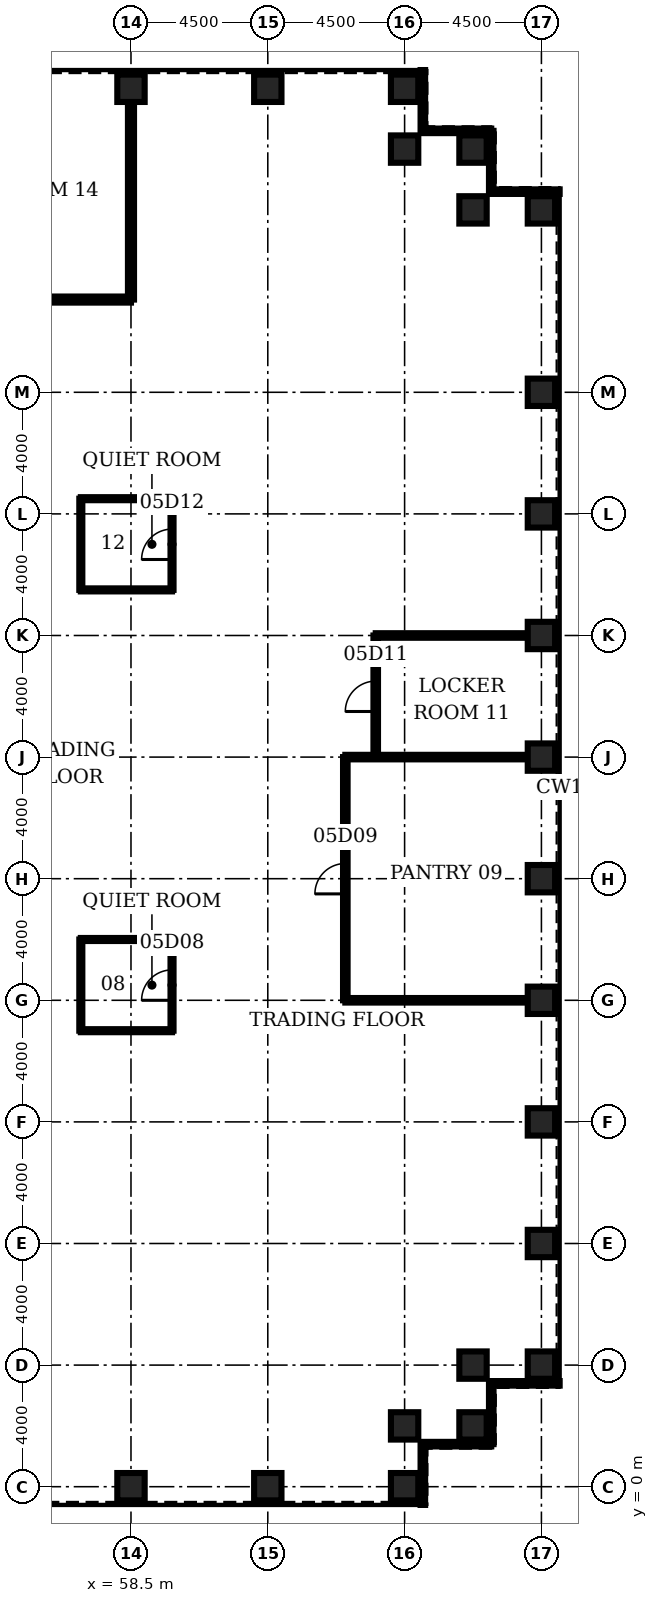
"""IFC4 building model, lengths in metres.
Left out: names, types, materials, properties, quantities, classifications, styles, units other than length and angle.
Written with IfcOpenShell. Run it as: python <this file> out.ifc"""

import sys

from ifc_helpers import new_model, si_unit, direction, frame, frame_2d, origin, origin_2d, place, context, subcontext, project, spatial, rectangle, hollow_rectangle, extrude, element, fill, save


model = new_model("IFC4")
c1 = context("Model", 3, precision=1e-05, world=origin(), true_north=direction((0.0, 1.0)))
c2 = subcontext(c1, "Body", "Model", "MODEL_VIEW")
j1 = project(units=[si_unit("LENGTHUNIT", "METRE"), si_unit("PLANEANGLEUNIT", "RADIAN")], contexts=[c1])
p1 = place(None, origin())
s1 = spatial("IfcSite", under=j1, at=p1, CompositionType="ELEMENT")
p2 = place(p1, origin())
s2 = spatial("IfcBuilding", under=s1, at=p2, CompositionType="ELEMENT")
p3 = place(p2, frame((0.0, 0.0, 27.5)))
s3 = spatial("IfcBuildingStorey", under=s2, at=p3, CompositionType="ELEMENT", Elevation=27.5)
for number, where, z_axis, x_axis in (
    (1, (58.5, 0.0, 0.0), (0.0, 0.0, 1.0), (0.0, 1.0, 0.0)),
    (2, (63.0, 0.0, 0.0), (0.0, 0.0, 1.0), (0.0, 1.0, 0.0)),
    (3, (67.5, 0.0, 0.0), (0.0, 0.0, 1.0), (0.0, 1.0, 0.0)),
    (4, (67.5, 2.0, 0.0), (0.0, 0.0, 1.0), (0.0, 1.0, 0.0)),
    (5, (69.75, 2.0, 0.0), (0.0, 0.0, 1.0), (1.0, 0.0, 0.0)),
    (6, (69.75, 4.0, 0.0), (0.0, 0.0, 1.0), (1.0, 0.0, 0.0)),
    (7, (72.0, 4.0, 0.0), (0.0, 0.0, 1.0), (1.0, 0.0, 0.0)),
    (8, (72.0, 8.0, 0.0), (0.0, 0.0, 1.0), (1.0, 0.0, 0.0)),
    (9, (72.0, 12.0, 0.0), (0.0, 0.0, 1.0), (1.0, 0.0, 0.0)),
    (10, (72.0, 16.0, 0.0), (0.0, 0.0, 1.0), (1.0, 0.0, 0.0)),
    (11, (72.0, 20.0, 0.0), (0.0, 0.0, 1.0), (1.0, 0.0, 0.0)),
    (12, (72.0, 24.0, 0.0), (0.0, 0.0, 1.0), (1.0, 0.0, 0.0)),
    (13, (72.0, 28.0, 0.0), (0.0, 0.0, 1.0), (1.0, 0.0, 0.0)),
    (14, (72.0, 32.0, 0.0), (0.0, 0.0, 1.0), (1.0, 0.0, 0.0)),
    (15, (72.0, 36.0, 0.0), (0.0, 0.0, 1.0), (1.0, 0.0, 0.0)),
    (16, (72.0, 42.0, 0.0), (0.0, 0.0, 1.0), (1.0, 0.0, 0.0)),
    (17, (69.75, 42.0, 0.0), (0.0, 0.0, 1.0), (1.0, 0.0, 0.0)),
    (18, (69.75, 44.0, 0.0), (0.0, 0.0, 1.0), (1.0, 0.0, 0.0)),
    (19, (67.5, 44.0, 0.0), (0.0, 0.0, 1.0), (0.0, 1.0, 0.0)),
    (20, (67.5, 46.0, 0.0), (0.0, 0.0, 1.0), (0.0, 1.0, 0.0)),
    (21, (63.0, 46.0, 0.0), (0.0, 0.0, 1.0), (0.0, 1.0, 0.0)),
    (22, (58.5, 46.0, 0.0), (0.0, 0.0, 1.0), (0.0, 1.0, 0.0)),
):
    element("IfcColumn", number, at=place(p3, frame(where, z_axis=z_axis, x_axis=x_axis)), inside=s3, PredefinedType="COLUMN", context=c2, shape_type="SweptSolid", body=[
        extrude(hollow_rectangle(XDim=0.9, YDim=0.9, WallThickness=0.12, at=origin_2d()), origin(), (0.0, 0.0, 1.0), 4.5),
    ])
p4 = place(p3, frame((56.85, 15.0, 0.0), z_axis=(0.0, 0.0, 1.0), x_axis=(1.0, 0.0, 0.0)))
e23 = element("IfcWall", 23, at=p4, inside=s3, PredefinedType="PARTITIONING", context=c2, shape_type="SweptSolid", body=[
    extrude(rectangle(XDim=3.0, YDim=0.1, at=frame_2d((1.5, 0.0))), origin(), (0.0, 0.0, 1.0), 3.0),
])
p5 = place(p3, frame((65.55, 16.0, 0.0), z_axis=(0.0, 0.0, 1.0), x_axis=(1.0, 0.0, 0.0)))
e24 = element("IfcWall", 24, at=p5, inside=s3, PredefinedType="PARTITIONING", context=c2, shape_type="SweptSolid", body=[
    extrude(rectangle(XDim=6.0, YDim=0.15, at=frame_2d((3.0, 0.0))), origin(), (0.0, 0.0, 1.0), 3.0),
])
p6 = place(p3, frame((56.85, 18.0, 0.0), z_axis=(0.0, 0.0, 1.0), x_axis=(1.0, 0.0, 0.0)))
e25 = element("IfcWall", 25, at=p6, inside=s3, PredefinedType="PARTITIONING", context=c2, shape_type="SweptSolid", body=[
    extrude(rectangle(XDim=3.0, YDim=0.1, at=frame_2d((1.5, 0.0))), origin(), (0.0, 0.0, 1.0), 3.0),
])
p7 = place(p3, frame((65.55, 24.0, 0.0), z_axis=(0.0, 0.0, 1.0), x_axis=(1.0, 0.0, 0.0)))
e26 = element("IfcWall", 26, at=p7, inside=s3, PredefinedType="PARTITIONING", context=c2, shape_type="SweptSolid", body=[
    extrude(rectangle(XDim=6.0, YDim=0.15, at=frame_2d((3.0, 0.0))), origin(), (0.0, 0.0, 1.0), 3.0),
])
p8 = place(p3, frame((66.55, 28.0, 0.0), z_axis=(0.0, 0.0, 1.0), x_axis=(1.0, 0.0, 0.0)))
e27 = element("IfcWall", 27, at=p8, inside=s3, PredefinedType="PARTITIONING", context=c2, shape_type="SweptSolid", body=[
    extrude(rectangle(XDim=5.0, YDim=0.15, at=frame_2d((2.5, 0.0))), origin(), (0.0, 0.0, 1.0), 3.0),
])
for number, where, z_axis, x_axis in (
    (28, (56.85, 29.5, 0.0), (0.0, 0.0, 1.0), (1.0, 0.0, 0.0)),
    (29, (56.85, 32.5, 0.0), (0.0, 0.0, 1.0), (1.0, 0.0, 0.0)),
):
    element("IfcWall", number, at=place(p3, frame(where, z_axis=z_axis, x_axis=x_axis)), inside=s3, PredefinedType="PARTITIONING", context=c2, shape_type="SweptSolid", body=[
        extrude(rectangle(XDim=3.0, YDim=0.1, at=frame_2d((1.5, 0.0))), origin(), (0.0, 0.0, 1.0), 3.0),
    ])
p9 = place(p3, frame((49.5, 39.05, 0.0), z_axis=(0.0, 0.0, 1.0), x_axis=(1.0, 0.0, 0.0)))
e30 = element("IfcWall", 30, at=p9, inside=s3, PredefinedType="PARTITIONING", context=c2, shape_type="SweptSolid", body=[
    extrude(rectangle(XDim=9.0, YDim=0.2, at=frame_2d((4.5, 0.0))), origin(), (0.0, 0.0, 1.0), 3.0),
])
p10 = place(p9, frame((0.45, 0.0, 0.0)))
e31 = element("IfcOpeningElement", 31, at=p10, cuts=e30, PredefinedType="OPENING", context=c2, shape_type="SweptSolid", body=[
    extrude(rectangle(XDim=1.6, YDim=2.1, at=frame_2d((0.8, 1.05))), frame((0.0, 0.11, 0.0), z_axis=(0.0, -1.0, 0.0), x_axis=(1.0, 0.0, 0.0)), (0.0, 0.0, 1.0), 0.22),
])
for number, where, z_axis, x_axis in (
    (32, (56.85, 15.0, 0.0), (0.0, 0.0, 1.0), (0.0, 1.0, 0.0)),
    (33, (56.85, 29.5, 0.0), (0.0, 0.0, 1.0), (0.0, 1.0, 0.0)),
):
    element("IfcWall", number, at=place(p3, frame(where, z_axis=z_axis, x_axis=x_axis)), inside=s3, PredefinedType="PARTITIONING", context=c2, shape_type="SweptSolid", body=[
        extrude(rectangle(XDim=3.0, YDim=0.1, at=frame_2d((1.5, 0.0))), origin(), (0.0, 0.0, 1.0), 3.0),
    ])
p11 = place(p3, frame((58.5, 39.05, 0.0), z_axis=(0.0, 0.0, 1.0), x_axis=(0.0, 1.0, 0.0)))
e34 = element("IfcWall", 34, at=p11, inside=s3, PredefinedType="PARTITIONING", context=c2, shape_type="SweptSolid", body=[
    extrude(rectangle(XDim=6.5, YDim=0.2, at=frame_2d((3.25, 0.0))), origin(), (0.0, 0.0, 1.0), 3.0),
])
p12 = place(p3, frame((59.85, 15.0, 0.0), z_axis=(0.0, 0.0, 1.0), x_axis=(0.0, 1.0, 0.0)))
e35 = element("IfcWall", 35, at=p12, inside=s3, PredefinedType="PARTITIONING", context=c2, shape_type="SweptSolid", body=[
    extrude(rectangle(XDim=3.0, YDim=0.1, at=frame_2d((1.5, 0.0))), origin(), (0.0, 0.0, 1.0), 3.0),
])
p13 = place(p12, frame((1.0, 0.0, 0.0)))
e36 = element("IfcOpeningElement", 36, at=p13, cuts=e35, PredefinedType="OPENING", context=c2, shape_type="SweptSolid", body=[
    extrude(rectangle(XDim=1.0, YDim=2.1, at=frame_2d((0.5, 1.05))), frame((0.0, 0.06, 0.0), z_axis=(0.0, -1.0, 0.0), x_axis=(1.0, 0.0, 0.0)), (0.0, 0.0, 1.0), 0.12),
])
p14 = place(p3, frame((59.85, 29.5, 0.0), z_axis=(0.0, 0.0, 1.0), x_axis=(0.0, 1.0, 0.0)))
e37 = element("IfcWall", 37, at=p14, inside=s3, PredefinedType="PARTITIONING", context=c2, shape_type="SweptSolid", body=[
    extrude(rectangle(XDim=3.0, YDim=0.1, at=frame_2d((1.5, 0.0))), origin(), (0.0, 0.0, 1.0), 3.0),
])
p15 = place(p14, frame((1.0, 0.0, 0.0)))
e38 = element("IfcOpeningElement", 38, at=p15, cuts=e37, PredefinedType="OPENING", context=c2, shape_type="SweptSolid", body=[
    extrude(rectangle(XDim=1.0, YDim=2.1, at=frame_2d((0.5, 1.05))), frame((0.0, 0.06, 0.0), z_axis=(0.0, -1.0, 0.0), x_axis=(1.0, 0.0, 0.0)), (0.0, 0.0, 1.0), 0.12),
])
p16 = place(p3, frame((65.55, 16.0, 0.0), z_axis=(0.0, 0.0, 1.0), x_axis=(0.0, 1.0, 0.0)))
e39 = element("IfcWall", 39, at=p16, inside=s3, PredefinedType="PARTITIONING", context=c2, shape_type="SweptSolid", body=[
    extrude(rectangle(XDim=8.0, YDim=0.15, at=frame_2d((4.0, 0.0))), origin(), (0.0, 0.0, 1.0), 3.0),
])
p17 = place(p16, frame((3.5, 0.0, 0.0)))
e40 = element("IfcOpeningElement", 40, at=p17, cuts=e39, PredefinedType="OPENING", context=c2, shape_type="SweptSolid", body=[
    extrude(rectangle(XDim=1.0, YDim=2.1, at=frame_2d((0.5, 1.05))), frame((0.0, 0.085, 0.0), z_axis=(0.0, -1.0, 0.0), x_axis=(1.0, 0.0, 0.0)), (0.0, 0.0, 1.0), 0.17),
])
p18 = place(p3, frame((66.55, 24.0, 0.0), z_axis=(0.0, 0.0, 1.0), x_axis=(0.0, 1.0, 0.0)))
e41 = element("IfcWall", 41, at=p18, inside=s3, PredefinedType="PARTITIONING", context=c2, shape_type="SweptSolid", body=[
    extrude(rectangle(XDim=4.0, YDim=0.15, at=frame_2d((2.0, 0.0))), origin(), (0.0, 0.0, 1.0), 3.0),
])
p19 = place(p18, frame((1.5, 0.0, 0.0)))
e42 = element("IfcOpeningElement", 42, at=p19, cuts=e41, PredefinedType="OPENING", context=c2, shape_type="SweptSolid", body=[
    extrude(rectangle(XDim=1.0, YDim=2.1, at=frame_2d((0.5, 1.05))), frame((0.0, 0.085, 0.0), z_axis=(0.0, -1.0, 0.0), x_axis=(1.0, 0.0, 0.0)), (0.0, 0.0, 1.0), 0.17),
])
p20 = place(p3, frame((68.1, -0.6, 0.0), z_axis=(0.0, 0.0, 1.0), x_axis=(0.0, 1.0, 0.0)))
e43 = element("IfcWall", 43, at=p20, inside=s3, PredefinedType="ELEMENTEDWALL", context=c2, shape_type="SweptSolid", body=[
    extrude(rectangle(XDim=2.0, YDim=0.15, at=frame_2d((1.0, 0.0))), origin(), (0.0, 0.0, 1.0), 4.32),
])
p21 = place(p3, frame((68.1, 1.4, 0.0), z_axis=(0.0, 0.0, 1.0), x_axis=(1.0, 0.0, 0.0)))
e44 = element("IfcWall", 44, at=p21, inside=s3, PredefinedType="ELEMENTEDWALL", context=c2, shape_type="SweptSolid", body=[
    extrude(rectangle(XDim=2.25, YDim=0.15, at=frame_2d((1.125, 0.0))), origin(), (0.0, 0.0, 1.0), 4.32),
])
p22 = place(p3, frame((70.35, 1.4, 0.0), z_axis=(0.0, 0.0, 1.0), x_axis=(0.0, 1.0, 0.0)))
e45 = element("IfcWall", 45, at=p22, inside=s3, PredefinedType="ELEMENTEDWALL", context=c2, shape_type="SweptSolid", body=[
    extrude(rectangle(XDim=2.0, YDim=0.15, at=frame_2d((1.0, 0.0))), origin(), (0.0, 0.0, 1.0), 4.32),
])
for number, where, z_axis, x_axis in (
    (46, (70.35, 3.4, 0.0), (0.0, 0.0, 1.0), (1.0, 0.0, 0.0)),
    (47, (72.6, 42.6, 0.0), (0.0, 0.0, 1.0), (-1.0, 0.0, 0.0)),
):
    element("IfcWall", number, at=place(p3, frame(where, z_axis=z_axis, x_axis=x_axis)), inside=s3, PredefinedType="ELEMENTEDWALL", context=c2, shape_type="SweptSolid", body=[
        extrude(rectangle(XDim=2.25, YDim=0.15, at=frame_2d((1.125, 0.0))), origin(), (0.0, 0.0, 1.0), 4.32),
    ])
p23 = place(p3, frame((70.35, 42.6, 0.0), z_axis=(0.0, 0.0, 1.0), x_axis=(0.0, 1.0, 0.0)))
e48 = element("IfcWall", 48, at=p23, inside=s3, PredefinedType="ELEMENTEDWALL", context=c2, shape_type="SweptSolid", body=[
    extrude(rectangle(XDim=2.0, YDim=0.15, at=frame_2d((1.0, 0.0))), origin(), (0.0, 0.0, 1.0), 4.32),
])
p24 = place(p3, frame((70.35, 44.6, 0.0), z_axis=(0.0, 0.0, 1.0), x_axis=(-1.0, 0.0, 0.0)))
e49 = element("IfcWall", 49, at=p24, inside=s3, PredefinedType="ELEMENTEDWALL", context=c2, shape_type="SweptSolid", body=[
    extrude(rectangle(XDim=2.25, YDim=0.15, at=frame_2d((1.125, 0.0))), origin(), (0.0, 0.0, 1.0), 4.32),
])
p25 = place(p3, frame((68.1, 44.6, 0.0), z_axis=(0.0, 0.0, 1.0), x_axis=(0.0, 1.0, 0.0)))
e50 = element("IfcWall", 50, at=p25, inside=s3, PredefinedType="ELEMENTEDWALL", context=c2, shape_type="SweptSolid", body=[
    extrude(rectangle(XDim=2.0, YDim=0.15, at=frame_2d((1.0, 0.0))), origin(), (0.0, 0.0, 1.0), 4.32),
])
p26 = place(p13, origin())
e51 = element("IfcDoor", 51, at=p26, inside=s3, OperationType="SINGLE_SWING_LEFT", PredefinedType="DOOR", context=c2, shape_type="SweptSolid", body=[
    extrude(rectangle(XDim=1.0, YDim=2.1, at=frame_2d((0.5, 1.05))), frame((0.0, 0.025, 0.0), z_axis=(0.0, -1.0, 0.0), x_axis=(1.0, 0.0, 0.0)), (0.0, 0.0, 1.0), 0.05),
])
fill(e36, e51)
p27 = place(p17, origin())
e52 = element("IfcDoor", 52, at=p27, inside=s3, OperationType="SINGLE_SWING_LEFT", PredefinedType="DOOR", context=c2, shape_type="SweptSolid", body=[
    extrude(rectangle(XDim=1.0, YDim=2.1, at=frame_2d((0.5, 1.05))), frame((0.0, 0.025, 0.0), z_axis=(0.0, -1.0, 0.0), x_axis=(1.0, 0.0, 0.0)), (0.0, 0.0, 1.0), 0.05),
])
fill(e40, e52)
p28 = place(p19, origin())
e53 = element("IfcDoor", 53, at=p28, inside=s3, OperationType="SINGLE_SWING_LEFT", PredefinedType="DOOR", context=c2, shape_type="SweptSolid", body=[
    extrude(rectangle(XDim=1.0, YDim=2.1, at=frame_2d((0.5, 1.05))), frame((0.0, 0.025, 0.0), z_axis=(0.0, -1.0, 0.0), x_axis=(1.0, 0.0, 0.0)), (0.0, 0.0, 1.0), 0.05),
])
fill(e42, e53)
p29 = place(p15, origin())
e54 = element("IfcDoor", 54, at=p29, inside=s3, OperationType="SINGLE_SWING_LEFT", PredefinedType="DOOR", context=c2, shape_type="SweptSolid", body=[
    extrude(rectangle(XDim=1.0, YDim=2.1, at=frame_2d((0.5, 1.05))), frame((0.0, 0.025, 0.0), z_axis=(0.0, -1.0, 0.0), x_axis=(1.0, 0.0, 0.0)), (0.0, 0.0, 1.0), 0.05),
])
fill(e38, e54)
save(model, sys.argv[1])
